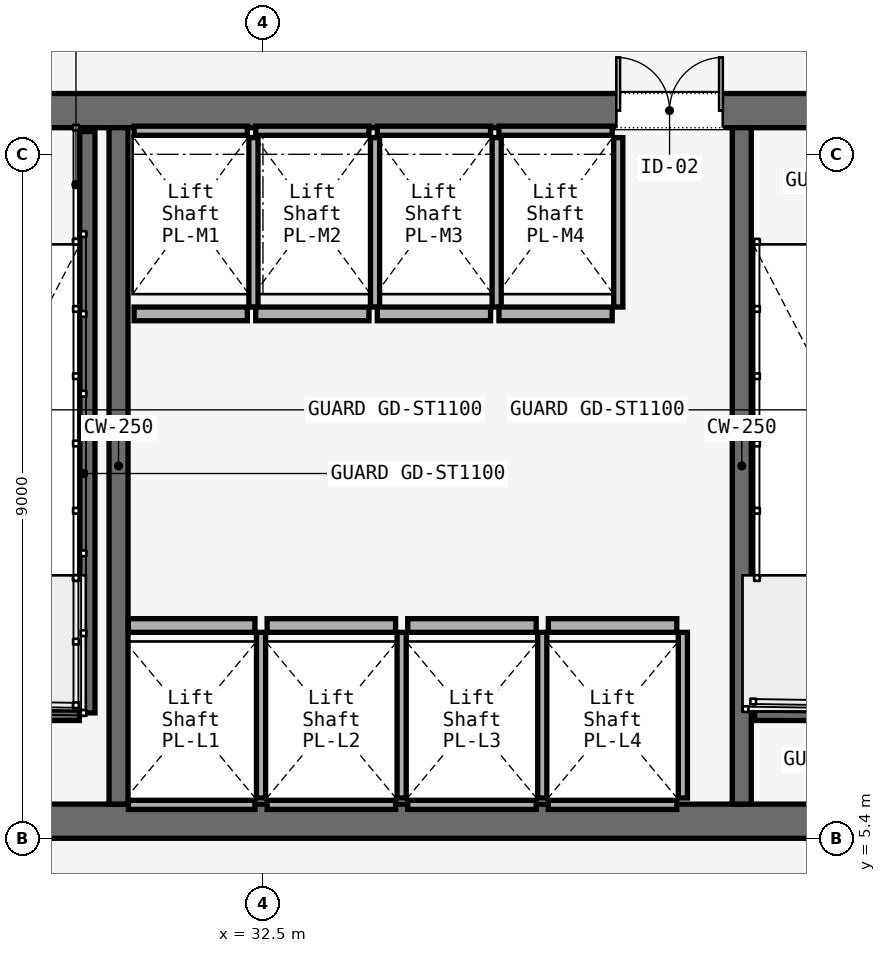
"""IFC4 building model, lengths in metres.
Left out: names, types, materials, properties, quantities, classifications, styles, units other than length and angle.
Written with IfcOpenShell. Run it as: python <this file> out.ifc"""

import sys

from ifc_helpers import new_model, si_unit, direction, frame, frame_2d, origin, place, context, subcontext, project, spatial, rectangle, extrude, element, fill, save


model = new_model("IFC4")
c1 = context("Model", 3, precision=1e-05, world=origin(), true_north=direction((0.0, 1.0)))
c2 = subcontext(c1, "Body", "Model", "MODEL_VIEW")
j1 = project(units=[si_unit("LENGTHUNIT", "METRE"), si_unit("PLANEANGLEUNIT", "RADIAN")], contexts=[c1])
p1 = place(None, origin())
s1 = spatial("IfcSite", under=j1, at=p1, CompositionType="ELEMENT")
p2 = place(p1, origin())
s2 = spatial("IfcBuilding", under=s1, at=p2, CompositionType="ELEMENT")
p3 = place(p2, frame((0.0, 0.0, 12.0)))
s3 = spatial("IfcBuildingStorey", under=s2, at=p3, CompositionType="ELEMENT", Elevation=12.0)
p4 = place(p3, frame((26.45, 14.975, 0.0), z_axis=(0.0, 0.0, 1.0), x_axis=(1.0, 0.0, 0.0)))
e1 = element("IfcWall", 1, at=p4, inside=s3, PredefinedType="SOLIDWALL", context=c2, shape_type="SweptSolid", body=[
    extrude(rectangle(XDim=31.1, YDim=0.45, at=frame_2d((15.55, 0.0))), origin(), (0.0, 0.0, 1.0), 5.7),
])
p5 = place(p4, frame((1.65, 0.0, 0.0)))
e2 = element("IfcOpeningElement", 2, at=p5, cuts=e1, PredefinedType="OPENING", context=c2, shape_type="SweptSolid", body=[
    extrude(rectangle(XDim=1.1, YDim=2.2, at=frame_2d((0.55, 1.1))), frame((0.0, 0.225, 0.0), z_axis=(0.0, -1.0, 0.0), x_axis=(1.0, 0.0, 0.0)), (0.0, 0.0, 1.0), 0.45),
])
p6 = place(p4, frame((13.65, 0.0, 0.0)))
e3 = element("IfcOpeningElement", 3, at=p6, cuts=e1, PredefinedType="OPENING", context=c2, shape_type="SweptSolid", body=[
    extrude(rectangle(XDim=1.1, YDim=2.2, at=frame_2d((0.55, 1.1))), frame((0.0, 0.225, 0.0), z_axis=(0.0, -1.0, 0.0), x_axis=(1.0, 0.0, 0.0)), (0.0, 0.0, 1.0), 0.45),
])
p7 = place(p4, frame((25.55, 0.0, 0.0)))
e4 = element("IfcOpeningElement", 4, at=p7, cuts=e1, PredefinedType="OPENING", context=c2, shape_type="SweptSolid", body=[
    extrude(rectangle(XDim=1.1, YDim=2.2, at=frame_2d((0.55, 1.1))), frame((0.0, 0.225, 0.0), z_axis=(0.0, -1.0, 0.0), x_axis=(1.0, 0.0, 0.0)), (0.0, 0.0, 1.0), 0.45),
])
p8 = place(p4, frame((10.7, 0.0, 0.0)))
e5 = element("IfcOpeningElement", 5, at=p8, cuts=e1, PredefinedType="OPENING", context=c2, shape_type="SweptSolid", body=[
    extrude(rectangle(XDim=1.4, YDim=2.2, at=frame_2d((0.7, 1.1))), frame((0.0, 0.225, 0.0), z_axis=(0.0, -1.0, 0.0), x_axis=(1.0, 0.0, 0.0)), (0.0, 0.0, 1.0), 0.45),
])
p9 = place(p4, frame((19.35, 0.0, 0.0)))
e6 = element("IfcOpeningElement", 6, at=p9, cuts=e1, PredefinedType="OPENING", context=c2, shape_type="SweptSolid", body=[
    extrude(rectangle(XDim=1.1, YDim=2.2, at=frame_2d((0.55, 1.1))), frame((0.0, 0.225, 0.0), z_axis=(0.0, -1.0, 0.0), x_axis=(1.0, 0.0, 0.0)), (0.0, 0.0, 1.0), 0.45),
])
p10 = place(p4, frame((21.4, 0.0, 0.0)))
e7 = element("IfcOpeningElement", 7, at=p10, cuts=e1, PredefinedType="OPENING", context=c2, shape_type="SweptSolid", body=[
    extrude(rectangle(XDim=0.9, YDim=2.1, at=frame_2d((0.45, 1.05))), frame((0.0, 0.225, 0.0), z_axis=(0.0, -1.0, 0.0), x_axis=(1.0, 0.0, 0.0)), (0.0, 0.0, 1.0), 0.45),
])
p11 = place(p4, frame((23.35, 0.0, 0.0)))
e8 = element("IfcOpeningElement", 8, at=p11, cuts=e1, PredefinedType="OPENING", context=c2, shape_type="SweptSolid", body=[
    extrude(rectangle(XDim=1.3, YDim=2.3, at=frame_2d((0.65, 1.15))), frame((0.0, 0.225, 0.0), z_axis=(0.0, -1.0, 0.0), x_axis=(1.0, 0.0, 0.0)), (0.0, 0.0, 1.0), 0.45),
])
p12 = place(p3, frame((26.45, 5.625, 0.0), z_axis=(0.0, 0.0, 1.0), x_axis=(1.0, 0.0, 0.0)))
e9 = element("IfcWall", 9, at=p12, inside=s3, PredefinedType="SOLIDWALL", context=c2, shape_type="SweptSolid", body=[
    extrude(rectangle(XDim=31.1, YDim=0.45, at=frame_2d((15.55, 0.0))), origin(), (0.0, 0.0, 1.0), 5.7),
])
for number, where, z_axis, x_axis in (
    (10, (30.6, 5.85, 0.0), (0.0, 0.0, 1.0), (0.0, 1.0, 0.0)),
    (11, (38.8, 5.85, 0.0), (0.0, 0.0, 1.0), (0.0, 1.0, 0.0)),
):
    element("IfcWall", number, at=place(p3, frame(where, z_axis=z_axis, x_axis=x_axis)), inside=s3, PredefinedType="SOLIDWALL", context=c2, shape_type="SweptSolid", body=[
        extrude(rectangle(XDim=8.9, YDim=0.25, at=frame_2d((4.45, 0.0))), origin(), (0.0, 0.0, 1.0), 5.7),
    ])
p13 = place(p3, frame((30.19, 14.7, 0.0), z_axis=(0.0, 0.0, 1.0), x_axis=(0.0, -1.0, 0.0)))
e12 = element("IfcWall", 12, at=p13, inside=s3, PredefinedType="SOLIDWALL", context=c2, shape_type="SweptSolid", body=[
    extrude(rectangle(XDim=7.65, YDim=0.2, at=frame_2d((3.825, 0.0))), origin(), (0.0, 0.0, 1.0), 6.0),
])
for number, where, z_axis, x_axis in (
    (13, (26.97, 7.05, 0.0), (0.0, 0.0, 1.0), (1.0, 0.0, 0.0)),
    (14, (38.97, 7.05, 0.0), (0.0, 0.0, 1.0), (1.0, 0.0, 0.0)),
):
    element("IfcWall", number, at=place(p3, frame(where, z_axis=z_axis, x_axis=x_axis)), inside=s3, PredefinedType="SOLIDWALL", context=c2, shape_type="SweptSolid", body=[
        extrude(rectangle(XDim=3.115, YDim=0.2, at=frame_2d((1.558, 0.0))), origin(), (0.0, 0.0, 1.0), 6.0),
    ])
p14 = place(p3, frame((30.73, 8.2, 0.0), z_axis=(0.0, 0.0, 1.0), x_axis=(1.0, 0.0, 0.0)))
e15 = element("IfcWall", 15, at=p14, inside=s3, PredefinedType="SOLIDWALL", context=c2, shape_type="SweptSolid", body=[
    extrude(rectangle(XDim=1.665, YDim=0.18, at=frame_2d((0.833, 0.0))), origin(), (0.0, 0.0, 1.0), 4.819),
])
p15 = place(p3, frame((30.73, 5.84, 0.0), z_axis=(0.0, 0.0, 1.0), x_axis=(1.0, 0.0, 0.0)))
e16 = element("IfcWall", 16, at=p15, inside=s3, PredefinedType="SOLIDWALL", context=c2, shape_type="SweptSolid", body=[
    extrude(rectangle(XDim=1.665, YDim=0.12, at=frame_2d((0.833, 0.0))), origin(), (0.0, 0.0, 1.0), 4.819),
])
p16 = place(p3, frame((32.475, 5.93, 0.0), z_axis=(0.0, 0.0, 1.0), x_axis=(0.0, 1.0, 0.0)))
e17 = element("IfcWall", 17, at=p16, inside=s3, PredefinedType="SOLIDWALL", context=c2, shape_type="SweptSolid", body=[
    extrude(rectangle(XDim=2.18, YDim=0.12, at=frame_2d((1.09, 0.0))), origin(), (0.0, 0.0, 1.0), 4.819),
])
p17 = place(p3, frame((32.555, 8.2, 0.0), z_axis=(0.0, 0.0, 1.0), x_axis=(1.0, 0.0, 0.0)))
e18 = element("IfcWall", 18, at=p17, inside=s3, PredefinedType="SOLIDWALL", context=c2, shape_type="SweptSolid", body=[
    extrude(rectangle(XDim=1.69, YDim=0.18, at=frame_2d((0.845, 0.0))), origin(), (0.0, 0.0, 1.0), 4.819),
])
p18 = place(p3, frame((32.555, 5.84, 0.0), z_axis=(0.0, 0.0, 1.0), x_axis=(1.0, 0.0, 0.0)))
e19 = element("IfcWall", 19, at=p18, inside=s3, PredefinedType="SOLIDWALL", context=c2, shape_type="SweptSolid", body=[
    extrude(rectangle(XDim=1.69, YDim=0.12, at=frame_2d((0.845, 0.0))), origin(), (0.0, 0.0, 1.0), 4.819),
])
p19 = place(p3, frame((34.325, 5.93, 0.0), z_axis=(0.0, 0.0, 1.0), x_axis=(0.0, 1.0, 0.0)))
e20 = element("IfcWall", 20, at=p19, inside=s3, PredefinedType="SOLIDWALL", context=c2, shape_type="SweptSolid", body=[
    extrude(rectangle(XDim=2.18, YDim=0.12, at=frame_2d((1.09, 0.0))), origin(), (0.0, 0.0, 1.0), 4.819),
])
p20 = place(p3, frame((34.405, 8.2, 0.0), z_axis=(0.0, 0.0, 1.0), x_axis=(1.0, 0.0, 0.0)))
e21 = element("IfcWall", 21, at=p20, inside=s3, PredefinedType="SOLIDWALL", context=c2, shape_type="SweptSolid", body=[
    extrude(rectangle(XDim=1.69, YDim=0.18, at=frame_2d((0.845, 0.0))), origin(), (0.0, 0.0, 1.0), 4.819),
])
p21 = place(p3, frame((34.405, 5.84, 0.0), z_axis=(0.0, 0.0, 1.0), x_axis=(1.0, 0.0, 0.0)))
e22 = element("IfcWall", 22, at=p21, inside=s3, PredefinedType="SOLIDWALL", context=c2, shape_type="SweptSolid", body=[
    extrude(rectangle(XDim=1.69, YDim=0.12, at=frame_2d((0.845, 0.0))), origin(), (0.0, 0.0, 1.0), 4.819),
])
p22 = place(p3, frame((36.175, 5.93, 0.0), z_axis=(0.0, 0.0, 1.0), x_axis=(0.0, 1.0, 0.0)))
e23 = element("IfcWall", 23, at=p22, inside=s3, PredefinedType="SOLIDWALL", context=c2, shape_type="SweptSolid", body=[
    extrude(rectangle(XDim=2.18, YDim=0.12, at=frame_2d((1.09, 0.0))), origin(), (0.0, 0.0, 1.0), 4.819),
])
p23 = place(p3, frame((36.255, 8.2, 0.0), z_axis=(0.0, 0.0, 1.0), x_axis=(1.0, 0.0, 0.0)))
e24 = element("IfcWall", 24, at=p23, inside=s3, PredefinedType="SOLIDWALL", context=c2, shape_type="SweptSolid", body=[
    extrude(rectangle(XDim=1.69, YDim=0.18, at=frame_2d((0.845, 0.0))), origin(), (0.0, 0.0, 1.0), 4.819),
])
p24 = place(p3, frame((36.255, 5.84, 0.0), z_axis=(0.0, 0.0, 1.0), x_axis=(1.0, 0.0, 0.0)))
e25 = element("IfcWall", 25, at=p24, inside=s3, PredefinedType="SOLIDWALL", context=c2, shape_type="SweptSolid", body=[
    extrude(rectangle(XDim=1.69, YDim=0.12, at=frame_2d((0.845, 0.0))), origin(), (0.0, 0.0, 1.0), 4.819),
])
p25 = place(p3, frame((38.025, 5.93, 0.0), z_axis=(0.0, 0.0, 1.0), x_axis=(0.0, 1.0, 0.0)))
e26 = element("IfcWall", 26, at=p25, inside=s3, PredefinedType="SOLIDWALL", context=c2, shape_type="SweptSolid", body=[
    extrude(rectangle(XDim=2.18, YDim=0.12, at=frame_2d((1.09, 0.0))), origin(), (0.0, 0.0, 1.0), 4.819),
])
p26 = place(p3, frame((30.805, 12.3, 0.0), z_axis=(0.0, 0.0, 1.0), x_axis=(1.0, 0.0, 0.0)))
e27 = element("IfcWall", 27, at=p26, inside=s3, PredefinedType="SOLIDWALL", context=c2, shape_type="SweptSolid", body=[
    extrude(rectangle(XDim=1.49, YDim=0.18, at=frame_2d((0.745, 0.0))), origin(), (0.0, 0.0, 1.0), 4.819),
])
p27 = place(p3, frame((30.805, 14.71, 0.0), z_axis=(0.0, 0.0, 1.0), x_axis=(1.0, 0.0, 0.0)))
e28 = element("IfcWall", 28, at=p27, inside=s3, PredefinedType="SOLIDWALL", context=c2, shape_type="SweptSolid", body=[
    extrude(rectangle(XDim=1.49, YDim=0.12, at=frame_2d((0.745, 0.0))), origin(), (0.0, 0.0, 1.0), 4.819),
])
p28 = place(p3, frame((32.375, 12.39, 0.0), z_axis=(0.0, 0.0, 1.0), x_axis=(0.0, 1.0, 0.0)))
e29 = element("IfcWall", 29, at=p28, inside=s3, PredefinedType="SOLIDWALL", context=c2, shape_type="SweptSolid", body=[
    extrude(rectangle(XDim=2.23, YDim=0.12, at=frame_2d((1.115, 0.0))), origin(), (0.0, 0.0, 1.0), 4.819),
])
p29 = place(p3, frame((32.405, 12.3, 0.0), z_axis=(0.0, 0.0, 1.0), x_axis=(1.0, 0.0, 0.0)))
e30 = element("IfcWall", 30, at=p29, inside=s3, PredefinedType="SOLIDWALL", context=c2, shape_type="SweptSolid", body=[
    extrude(rectangle(XDim=1.49, YDim=0.18, at=frame_2d((0.745, 0.0))), origin(), (0.0, 0.0, 1.0), 4.819),
])
p30 = place(p3, frame((32.405, 14.71, 0.0), z_axis=(0.0, 0.0, 1.0), x_axis=(1.0, 0.0, 0.0)))
e31 = element("IfcWall", 31, at=p30, inside=s3, PredefinedType="SOLIDWALL", context=c2, shape_type="SweptSolid", body=[
    extrude(rectangle(XDim=1.49, YDim=0.12, at=frame_2d((0.745, 0.0))), origin(), (0.0, 0.0, 1.0), 4.819),
])
p31 = place(p3, frame((33.975, 12.39, 0.0), z_axis=(0.0, 0.0, 1.0), x_axis=(0.0, 1.0, 0.0)))
e32 = element("IfcWall", 32, at=p31, inside=s3, PredefinedType="SOLIDWALL", context=c2, shape_type="SweptSolid", body=[
    extrude(rectangle(XDim=2.23, YDim=0.12, at=frame_2d((1.115, 0.0))), origin(), (0.0, 0.0, 1.0), 4.819),
])
p32 = place(p3, frame((34.005, 12.3, 0.0), z_axis=(0.0, 0.0, 1.0), x_axis=(1.0, 0.0, 0.0)))
e33 = element("IfcWall", 33, at=p32, inside=s3, PredefinedType="SOLIDWALL", context=c2, shape_type="SweptSolid", body=[
    extrude(rectangle(XDim=1.49, YDim=0.18, at=frame_2d((0.745, 0.0))), origin(), (0.0, 0.0, 1.0), 4.819),
])
p33 = place(p3, frame((34.005, 14.71, 0.0), z_axis=(0.0, 0.0, 1.0), x_axis=(1.0, 0.0, 0.0)))
e34 = element("IfcWall", 34, at=p33, inside=s3, PredefinedType="SOLIDWALL", context=c2, shape_type="SweptSolid", body=[
    extrude(rectangle(XDim=1.49, YDim=0.12, at=frame_2d((0.745, 0.0))), origin(), (0.0, 0.0, 1.0), 4.819),
])
p34 = place(p3, frame((35.575, 12.39, 0.0), z_axis=(0.0, 0.0, 1.0), x_axis=(0.0, 1.0, 0.0)))
e35 = element("IfcWall", 35, at=p34, inside=s3, PredefinedType="SOLIDWALL", context=c2, shape_type="SweptSolid", body=[
    extrude(rectangle(XDim=2.23, YDim=0.12, at=frame_2d((1.115, 0.0))), origin(), (0.0, 0.0, 1.0), 4.819),
])
p35 = place(p3, frame((35.605, 12.3, 0.0), z_axis=(0.0, 0.0, 1.0), x_axis=(1.0, 0.0, 0.0)))
e36 = element("IfcWall", 36, at=p35, inside=s3, PredefinedType="SOLIDWALL", context=c2, shape_type="SweptSolid", body=[
    extrude(rectangle(XDim=1.49, YDim=0.18, at=frame_2d((0.745, 0.0))), origin(), (0.0, 0.0, 1.0), 4.819),
])
p36 = place(p3, frame((35.605, 14.71, 0.0), z_axis=(0.0, 0.0, 1.0), x_axis=(1.0, 0.0, 0.0)))
e37 = element("IfcWall", 37, at=p36, inside=s3, PredefinedType="SOLIDWALL", context=c2, shape_type="SweptSolid", body=[
    extrude(rectangle(XDim=1.49, YDim=0.12, at=frame_2d((0.745, 0.0))), origin(), (0.0, 0.0, 1.0), 4.819),
])
p37 = place(p3, frame((37.175, 12.39, 0.0), z_axis=(0.0, 0.0, 1.0), x_axis=(0.0, 1.0, 0.0)))
e38 = element("IfcWall", 38, at=p37, inside=s3, PredefinedType="SOLIDWALL", context=c2, shape_type="SweptSolid", body=[
    extrude(rectangle(XDim=2.23, YDim=0.12, at=frame_2d((1.115, 0.0))), origin(), (0.0, 0.0, 1.0), 4.819),
])
p38 = place(p8, origin())
e39 = element("IfcDoor", 39, at=p38, inside=s3, OperationType="DOUBLE_DOOR_SINGLE_SWING", PredefinedType="DOOR", context=c2, shape_type="SweptSolid", body=[
    extrude(rectangle(XDim=1.4, YDim=2.2, at=frame_2d((0.7, 1.1))), frame((0.0, 0.025, 0.0), z_axis=(0.0, -1.0, 0.0), x_axis=(1.0, 0.0, 0.0)), (0.0, 0.0, 1.0), 0.05),
])
fill(e5, e39)
save(model, sys.argv[1])
